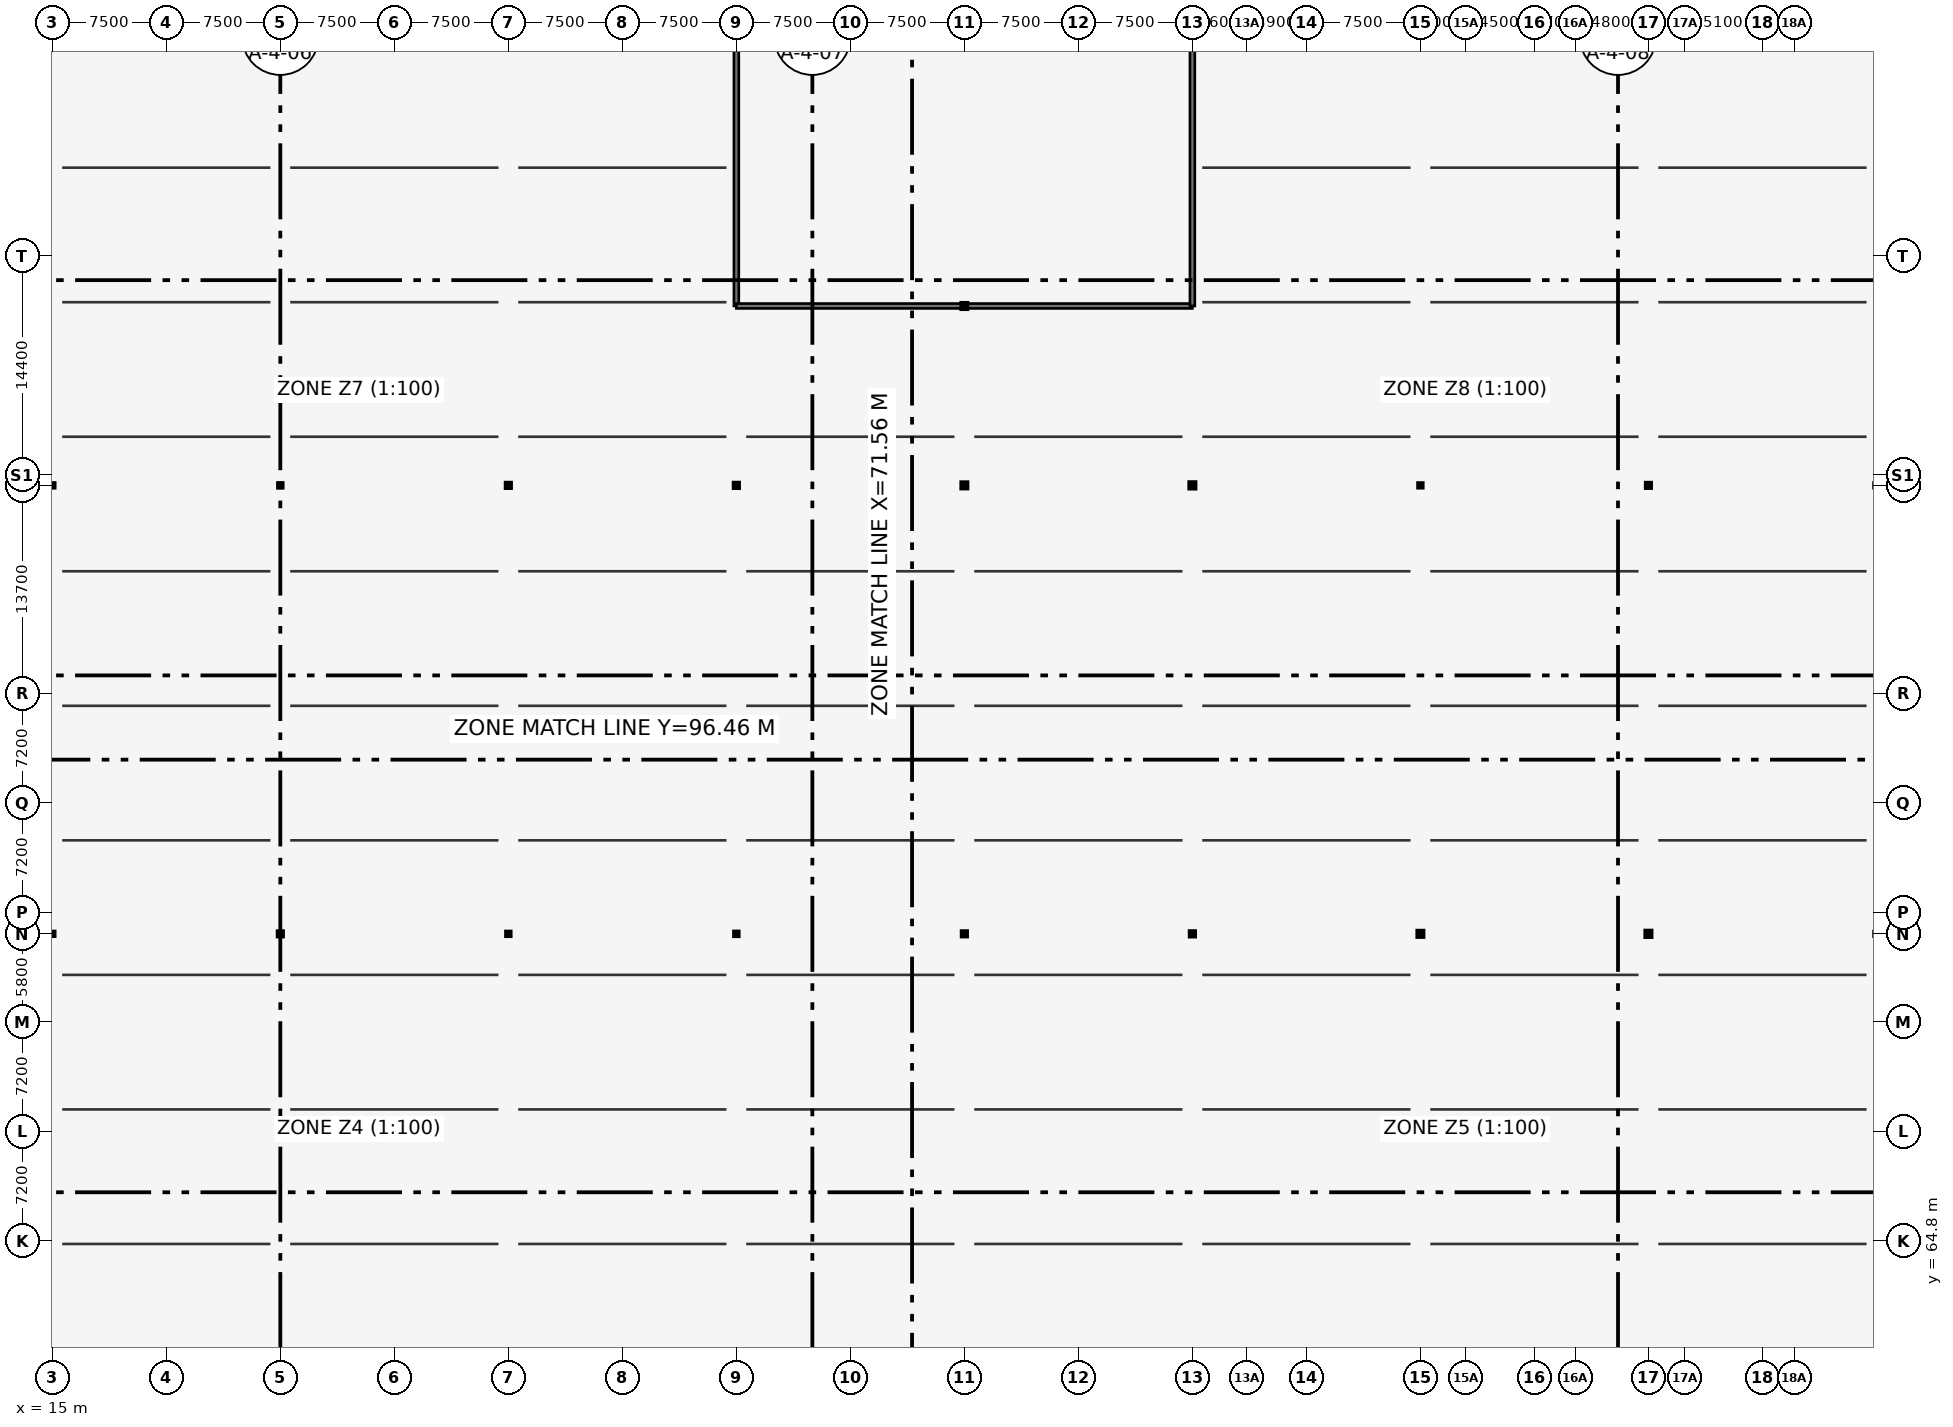
"""IFC4 building model, lengths in metres.
Left out: names, types, materials, properties, quantities, classifications, styles, units other than length and angle.
Written with IfcOpenShell. Run it as: python <this file> out.ifc"""

import sys

from ifc_helpers import new_model, si_unit, direction, frame, frame_2d, origin, origin_2d, place, context, subcontext, project, spatial, rectangle, hollow_rectangle, i_section, extrude, element, save


model = new_model("IFC4")
c1 = context("Model", 3, precision=1e-05, world=origin(), true_north=direction((0.0, 1.0)))
c2 = subcontext(c1, "Body", "Model", "MODEL_VIEW")
j1 = project(units=[si_unit("LENGTHUNIT", "METRE"), si_unit("PLANEANGLEUNIT", "RADIAN")], contexts=[c1])
p1 = place(None, origin())
s1 = spatial("IfcSite", under=j1, at=p1, CompositionType="ELEMENT")
p2 = place(p1, origin())
s2 = spatial("IfcBuilding", under=s1, at=p2, CompositionType="ELEMENT")
p3 = place(p2, origin())
s3 = spatial("IfcBuildingStorey", under=s2, at=p3, CompositionType="ELEMENT", Elevation=0.0)
p4 = place(p3, frame((15.0, 85.0, 0.0), z_axis=(0.0, 0.0, 1.0), x_axis=(1.0, 0.0, 0.0)))
e1 = element("IfcColumn", 1, at=p4, inside=s3, PredefinedType="COLUMN", context=c2, shape_type="SweptSolid", body=[
    extrude(hollow_rectangle(XDim=0.2, YDim=0.2, WallThickness=0.008, at=origin_2d()), origin(), (0.0, 0.0, 1.0), 7.6),
])
p5 = place(p3, frame((15.0, 114.5, 0.0), z_axis=(0.0, 0.0, 1.0), x_axis=(1.0, 0.0, 0.0)))
e2 = element("IfcColumn", 2, at=p5, inside=s3, PredefinedType="COLUMN", context=c2, shape_type="SweptSolid", body=[
    extrude(i_section(OverallWidth=0.203, OverallDepth=0.203, WebThickness=0.007, FlangeThickness=0.011, at=origin_2d()), origin(), (0.0, 0.0, 1.0), 7.6),
])
p6 = place(p3, frame((30.0, 85.0, 0.0), z_axis=(0.0, 0.0, 1.0), x_axis=(1.0, 0.0, 0.0)))
e3 = element("IfcColumn", 3, at=p6, inside=s3, PredefinedType="COLUMN", context=c2, shape_type="SweptSolid", body=[
    extrude(hollow_rectangle(XDim=0.25, YDim=0.25, WallThickness=0.01, at=origin_2d()), origin(), (0.0, 0.0, 1.0), 7.6),
])
p7 = place(p3, frame((30.0, 114.5, 0.0), z_axis=(0.0, 0.0, 1.0), x_axis=(1.0, 0.0, 0.0)))
e4 = element("IfcColumn", 4, at=p7, inside=s3, PredefinedType="COLUMN", context=c2, shape_type="SweptSolid", body=[
    extrude(i_section(OverallWidth=0.205, OverallDepth=0.21, WebThickness=0.009, FlangeThickness=0.014, at=origin_2d()), origin(), (0.0, 0.0, 1.0), 7.6),
])
p8 = place(p3, frame((45.0, 85.0, 0.0), z_axis=(0.0, 0.0, 1.0), x_axis=(1.0, 0.0, 0.0)))
e5 = element("IfcColumn", 5, at=p8, inside=s3, PredefinedType="COLUMN", context=c2, shape_type="SweptSolid", body=[
    extrude(i_section(OverallWidth=0.203, OverallDepth=0.203, WebThickness=0.007, FlangeThickness=0.011, at=origin_2d()), origin(), (0.0, 0.0, 1.0), 7.6),
])
p9 = place(p3, frame((45.0, 114.5, 0.0), z_axis=(0.0, 0.0, 1.0), x_axis=(1.0, 0.0, 0.0)))
e6 = element("IfcColumn", 6, at=p9, inside=s3, PredefinedType="COLUMN", context=c2, shape_type="SweptSolid", body=[
    extrude(i_section(OverallWidth=0.254, OverallDepth=0.254, WebThickness=0.009, FlangeThickness=0.014, at=origin_2d()), origin(), (0.0, 0.0, 1.0), 7.6),
])
p10 = place(p3, frame((60.0, 85.0, 0.0), z_axis=(0.0, 0.0, 1.0), x_axis=(1.0, 0.0, 0.0)))
e7 = element("IfcColumn", 7, at=p10, inside=s3, PredefinedType="COLUMN", context=c2, shape_type="SweptSolid", body=[
    extrude(i_section(OverallWidth=0.205, OverallDepth=0.21, WebThickness=0.009, FlangeThickness=0.014, at=origin_2d()), origin(), (0.0, 0.0, 1.0), 7.6),
])
p11 = place(p3, frame((60.0, 114.5, 0.0), z_axis=(0.0, 0.0, 1.0), x_axis=(1.0, 0.0, 0.0)))
e8 = element("IfcColumn", 8, at=p11, inside=s3, PredefinedType="COLUMN", context=c2, shape_type="SweptSolid", body=[
    extrude(i_section(OverallWidth=0.256, OverallDepth=0.26, WebThickness=0.01, FlangeThickness=0.017, at=origin_2d()), origin(), (0.0, 0.0, 1.0), 7.6),
])
p12 = place(p3, frame((75.0, 85.0, 0.0), z_axis=(0.0, 0.0, 1.0), x_axis=(1.0, 0.0, 0.0)))
e9 = element("IfcColumn", 9, at=p12, inside=s3, PredefinedType="COLUMN", context=c2, shape_type="SweptSolid", body=[
    extrude(i_section(OverallWidth=0.254, OverallDepth=0.254, WebThickness=0.009, FlangeThickness=0.014, at=origin_2d()), origin(), (0.0, 0.0, 1.0), 7.6),
])
for number, where, z_axis, x_axis in (
    (10, (75.0, 114.5, 0.0), (0.0, 0.0, 1.0), (1.0, 0.0, 0.0)),
    (11, (75.0, 126.3, 0.0), (0.0, 0.0, 1.0), (1.0, 0.0, 0.0)),
):
    element("IfcColumn", number, at=place(p3, frame(where, z_axis=z_axis, x_axis=x_axis)), inside=s3, PredefinedType="COLUMN", context=c2, shape_type="SweptSolid", body=[
        extrude(i_section(OverallWidth=0.307, OverallDepth=0.315, WebThickness=0.012, FlangeThickness=0.019, at=origin_2d()), origin(), (0.0, 0.0, 1.0), 7.6),
    ])
p13 = place(p3, frame((90.0, 85.0, 0.0), z_axis=(0.0, 0.0, 1.0), x_axis=(1.0, 0.0, 0.0)))
e12 = element("IfcColumn", 12, at=p13, inside=s3, PredefinedType="COLUMN", context=c2, shape_type="SweptSolid", body=[
    extrude(i_section(OverallWidth=0.256, OverallDepth=0.26, WebThickness=0.01, FlangeThickness=0.017, at=origin_2d()), origin(), (0.0, 0.0, 1.0), 7.6),
])
p14 = place(p3, frame((90.0, 114.5, 0.0), z_axis=(0.0, 0.0, 1.0), x_axis=(1.0, 0.0, 0.0)))
e13 = element("IfcColumn", 13, at=p14, inside=s3, PredefinedType="COLUMN", context=c2, shape_type="SweptSolid", body=[
    extrude(i_section(OverallWidth=0.311, OverallDepth=0.327, WebThickness=0.016, FlangeThickness=0.025, at=origin_2d()), origin(), (0.0, 0.0, 1.0), 7.6),
])
p15 = place(p3, frame((105.0, 85.0, 0.0), z_axis=(0.0, 0.0, 1.0), x_axis=(1.0, 0.0, 0.0)))
e14 = element("IfcColumn", 14, at=p15, inside=s3, PredefinedType="COLUMN", context=c2, shape_type="SweptSolid", body=[
    extrude(i_section(OverallWidth=0.307, OverallDepth=0.315, WebThickness=0.012, FlangeThickness=0.019, at=origin_2d()), origin(), (0.0, 0.0, 1.0), 7.6),
])
p16 = place(p3, frame((105.0, 114.5, 0.0), z_axis=(0.0, 0.0, 1.0), x_axis=(1.0, 0.0, 0.0)))
e15 = element("IfcColumn", 15, at=p16, inside=s3, PredefinedType="COLUMN", context=c2, shape_type="SweptSolid", body=[
    extrude(hollow_rectangle(XDim=0.2, YDim=0.2, WallThickness=0.008, at=origin_2d()), origin(), (0.0, 0.0, 1.0), 7.6),
])
p17 = place(p3, frame((120.0, 85.0, 0.0), z_axis=(0.0, 0.0, 1.0), x_axis=(1.0, 0.0, 0.0)))
e16 = element("IfcColumn", 16, at=p17, inside=s3, PredefinedType="COLUMN", context=c2, shape_type="SweptSolid", body=[
    extrude(i_section(OverallWidth=0.311, OverallDepth=0.327, WebThickness=0.016, FlangeThickness=0.025, at=origin_2d()), origin(), (0.0, 0.0, 1.0), 7.6),
])
p18 = place(p3, frame((120.0, 114.5, 0.0), z_axis=(0.0, 0.0, 1.0), x_axis=(1.0, 0.0, 0.0)))
e17 = element("IfcColumn", 17, at=p18, inside=s3, PredefinedType="COLUMN", context=c2, shape_type="SweptSolid", body=[
    extrude(hollow_rectangle(XDim=0.25, YDim=0.25, WallThickness=0.01, at=origin_2d()), origin(), (0.0, 0.0, 1.0), 7.6),
])
p19 = place(p3, frame((60.0, 126.3, 0.0), z_axis=(0.0, 0.0, 1.0), x_axis=(0.0, 1.0, 0.0)))
e18 = element("IfcWall", 18, at=p19, inside=s3, PredefinedType="SOLIDWALL", context=c2, shape_type="SweptSolid", body=[
    extrude(rectangle(XDim=17.7, YDim=0.32, at=frame_2d((8.85, 0.0))), origin(), (0.0, 0.0, 1.0), 6.329),
])
p20 = place(p3, frame((90.0, 126.3, 0.0), z_axis=(0.0, 0.0, 1.0), x_axis=(-1.0, 0.0, 0.0)))
e19 = element("IfcWall", 19, at=p20, inside=s3, PredefinedType="SOLIDWALL", context=c2, shape_type="SweptSolid", body=[
    extrude(rectangle(XDim=30.0, YDim=0.32, at=frame_2d((15.0, 0.0))), origin(), (0.0, 0.0, 1.0), 6.219),
])
p21 = place(p3, frame((90.0, 144.0, 0.0), z_axis=(0.0, 0.0, 1.0), x_axis=(0.0, -1.0, 0.0)))
e20 = element("IfcWall", 20, at=p21, inside=s3, PredefinedType="SOLIDWALL", context=c2, shape_type="SweptSolid", body=[
    extrude(rectangle(XDim=17.7, YDim=0.32, at=frame_2d((8.85, 0.0))), origin(), (0.0, 0.0, 1.0), 6.219),
])
save(model, sys.argv[1])
